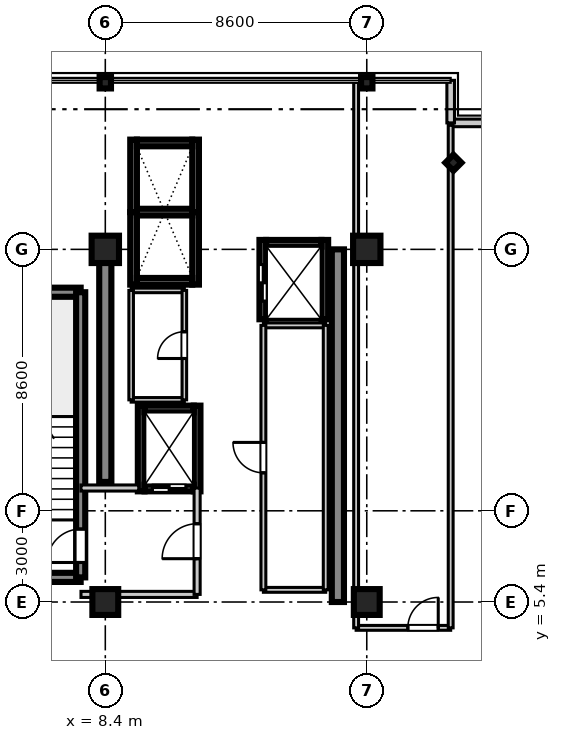
"""IFC4 building model, lengths in metres.
Left out: names, types, materials, properties, quantities, classifications, styles, units other than length and angle.
Written with IfcOpenShell. Run it as: python <this file> out.ifc"""

import sys

from ifc_helpers import new_model, si_unit, direction, frame, frame_2d, origin, origin_2d, place, context, subcontext, project, spatial, rectangle, i_section, extrude, source, transform, mapped, element, fill, save


model = new_model("IFC4")
c1 = context("Model", 3, precision=1e-05, world=origin(), true_north=direction((0.0, 1.0)))
c2 = subcontext(c1, "Body", "Model", "MODEL_VIEW")
j1 = project(units=[si_unit("LENGTHUNIT", "METRE"), si_unit("PLANEANGLEUNIT", "RADIAN")], contexts=[c1])
p1 = place(None, origin())
s1 = spatial("IfcSite", under=j1, at=p1, CompositionType="ELEMENT")
p2 = place(p1, origin())
s2 = spatial("IfcBuilding", under=s1, at=p2, CompositionType="ELEMENT")
p3 = place(p2, frame((0.0, 0.0, 273.8)))
s3 = spatial("IfcBuildingStorey", under=s2, at=p3, CompositionType="ELEMENT", Elevation=273.8)
m1 = source(origin(), c2, "Body", "SweptSolid", [
    extrude(rectangle(XDim=0.85, YDim=0.85, at=origin_2d()), origin(), (0.0, 0.0, 1.0), 3.705),
])
p4 = place(p3, frame((8.4, 5.4, 0.0), z_axis=(0.0, 0.0, 1.0), x_axis=(1.0, 0.0, 0.0)))
e1 = element("IfcColumn", 1, at=p4, inside=s3, PredefinedType="PILASTER", context=c2, shape_type="MappedRepresentation", body=[
    mapped(m1, transform((0.0, 0.0, 0.0), scale=1.0)),
])
m2 = source(origin(), c2, "Body", "SweptSolid", [
    extrude(rectangle(XDim=0.9, YDim=0.9, at=origin_2d()), origin(), (0.0, 0.0, 1.0), 3.705),
])
p5 = place(p3, frame((8.4, 17.0, 0.0), z_axis=(0.0, 0.0, 1.0), x_axis=(1.0, 0.0, 0.0)))
e2 = element("IfcColumn", 2, at=p5, inside=s3, PredefinedType="COLUMN", context=c2, shape_type="MappedRepresentation", body=[
    mapped(m2, transform((0.0, 0.0, 0.0), scale=1.0)),
])
p6 = place(p3, frame((17.0, 5.4, 0.0), z_axis=(0.0, 0.0, 1.0), x_axis=(1.0, 0.0, 0.0)))
e3 = element("IfcColumn", 3, at=p6, inside=s3, PredefinedType="PILASTER", context=c2, shape_type="MappedRepresentation", body=[
    mapped(m1, transform((0.0, 0.0, 0.0), scale=1.0)),
])
p7 = place(p3, frame((17.0, 17.0, 0.0), z_axis=(0.0, 0.0, 1.0), x_axis=(1.0, 0.0, 0.0)))
e4 = element("IfcColumn", 4, at=p7, inside=s3, PredefinedType="COLUMN", context=c2, shape_type="MappedRepresentation", body=[
    mapped(m2, transform((0.0, 0.0, 0.0), scale=1.0)),
])
m3 = source(origin(), c2, "Body", "SweptSolid", [
    extrude(i_section(OverallWidth=0.374, OverallDepth=0.374, WebThickness=0.014, FlangeThickness=0.023, at=origin_2d()), origin(), (0.0, 0.0, 1.0), 3.705),
])
for number, where, z_axis, x_axis in (
    (5, (8.4, 22.48, 0.0), (0.0, 0.0, 1.0), (0.0, 1.0, 0.0)),
    (6, (17.0, 22.48, 0.0), (0.0, 0.0, 1.0), (0.0, 1.0, 0.0)),
    (7, (19.85, 19.85, 0.0), (0.0, 0.0, 1.0), (0.707, 0.707, 0.0)),
):
    element("IfcColumn", number, at=place(p3, frame(where, z_axis=z_axis, x_axis=x_axis)), inside=s3, PredefinedType="COLUMN", context=c2, shape_type="MappedRepresentation", body=[
        mapped(m3, transform((0.0, 0.0, 0.0), scale=1.0)),
    ])
m4 = source(origin(), c2, "Body", "SweptSolid", [
    extrude(rectangle(XDim=7.65, YDim=0.4, at=frame_2d((3.825, 0.0))), origin(), (0.0, 0.0, 1.0), 3.45),
])
p8 = place(p3, frame((8.4, 9.35, 0.0), z_axis=(0.0, 0.0, 1.0), x_axis=(0.0, 1.0, 0.0)))
e8 = element("IfcWall", 8, at=p8, inside=s3, PredefinedType="SHEAR", context=c2, shape_type="MappedRepresentation", body=[
    mapped(m4, transform((0.0, 0.0, 0.0), scale=1.0)),
])
m5 = source(origin(), c2, "Body", "SweptSolid", [
    extrude(rectangle(XDim=11.6, YDim=0.4, at=frame_2d((5.8, 0.0))), origin(), (0.0, 0.0, 1.0), 3.45),
])
p9 = place(p3, frame((16.05, 5.4, 0.0), z_axis=(0.0, 0.0, 1.0), x_axis=(0.0, 1.0, 0.0)))
e9 = element("IfcWall", 9, at=p9, inside=s3, PredefinedType="SHEAR", context=c2, shape_type="MappedRepresentation", body=[
    mapped(m5, transform((0.0, 0.0, 0.0), scale=1.0)),
])
m6 = source(origin(), c2, "Body", "SweptSolid", [
    extrude(rectangle(XDim=3.98, YDim=0.3, at=frame_2d((1.99, 0.0))), origin(), (0.0, 0.0, 1.0), 3.45),
])
for number, where, z_axis, x_axis in (
    (10, (3.61, 6.21, 0.0), (0.0, 0.0, 1.0), (1.0, 0.0, 0.0)),
    (11, (3.61, 15.59, 0.0), (0.0, 0.0, 1.0), (1.0, 0.0, 0.0)),
):
    element("IfcWall", number, at=place(p3, frame(where, z_axis=z_axis, x_axis=x_axis)), inside=s3, PredefinedType="SHEAR", context=c2, shape_type="MappedRepresentation", body=[
        mapped(m6, transform((0.0, 0.0, 0.0), scale=1.0)),
    ])
m7 = source(origin(), c2, "Body", "SweptSolid", [
    extrude(rectangle(XDim=9.38, YDim=0.3, at=frame_2d((4.69, 0.0))), origin(), (0.0, 0.0, 1.0), 3.45),
])
p10 = place(p3, frame((7.59, 6.21, 0.0), z_axis=(0.0, 0.0, 1.0), x_axis=(0.0, 1.0, 0.0)))
e12 = element("IfcWall", 12, at=p10, inside=s3, PredefinedType="SHEAR", context=c2, shape_type="MappedRepresentation", body=[
    mapped(m7, transform((0.0, 0.0, 0.0), scale=1.0)),
])
p11 = place(p10, frame((0.49, 0.0, 0.0)))
e13 = element("IfcOpeningElement", 13, at=p11, cuts=e12, PredefinedType="OPENING", context=c2, shape_type="SweptSolid", body=[
    extrude(rectangle(XDim=1.1, YDim=2.15, at=frame_2d((0.55, 1.075))), frame((0.0, 0.16, 0.0), z_axis=(0.0, -1.0, 0.0), x_axis=(1.0, 0.0, 0.0)), (0.0, 0.0, 1.0), 0.32),
])
m8 = source(origin(), c2, "Body", "SweptSolid", [
    extrude(rectangle(XDim=2.385, YDim=0.22, at=frame_2d((1.192, 0.0))), origin(), (0.0, 0.0, 1.0), 3.45),
])
for number, where, z_axis, x_axis in (
    (14, (9.33, 15.84, 0.0), (0.0, 0.0, 1.0), (0.0, 1.0, 0.0)),
    (15, (11.37, 15.84, 0.0), (0.0, 0.0, 1.0), (0.0, 1.0, 0.0)),
):
    element("IfcWall", number, at=place(p3, frame(where, z_axis=z_axis, x_axis=x_axis)), inside=s3, PredefinedType="SHEAR", context=c2, shape_type="MappedRepresentation", body=[
        mapped(m8, transform((0.0, 0.0, 0.0), scale=1.0)),
    ])
m9 = source(origin(), c2, "Body", "SweptSolid", [
    extrude(rectangle(XDim=1.82, YDim=0.22, at=frame_2d((0.91, 0.0))), origin(), (0.0, 0.0, 1.0), 3.45),
])
p12 = place(p3, frame((9.44, 15.95, 0.0), z_axis=(0.0, 0.0, 1.0), x_axis=(1.0, 0.0, 0.0)))
e16 = element("IfcWall", 16, at=p12, inside=s3, PredefinedType="SHEAR", context=c2, shape_type="MappedRepresentation", body=[
    mapped(m9, transform((0.0, 0.0, 0.0), scale=1.0)),
])
m10 = source(origin(), c2, "Body", "SweptSolid", [
    extrude(rectangle(XDim=1.82, YDim=0.22, at=frame_2d((0.91, 0.0))), origin(), (0.0, 0.0, 1.0), 3.75),
])
p13 = place(p3, frame((9.44, 18.225, 0.0), z_axis=(0.0, 0.0, 1.0), x_axis=(1.0, 0.0, 0.0)))
e17 = element("IfcWall", 17, at=p13, inside=s3, PredefinedType="SHEAR", context=c2, shape_type="MappedRepresentation", body=[
    mapped(m10, transform((0.0, 0.0, 0.0), scale=1.0)),
])
for number, where, z_axis, x_axis in (
    (18, (9.33, 18.225, 0.0), (0.0, 0.0, 1.0), (0.0, 1.0, 0.0)),
    (19, (11.37, 18.225, 0.0), (0.0, 0.0, 1.0), (0.0, 1.0, 0.0)),
):
    element("IfcWall", number, at=place(p3, frame(where, z_axis=z_axis, x_axis=x_axis)), inside=s3, PredefinedType="SHEAR", context=c2, shape_type="MappedRepresentation", body=[
        mapped(m8, transform((0.0, 0.0, 0.0), scale=1.0)),
    ])
p14 = place(p3, frame((9.44, 20.5, 0.0), z_axis=(0.0, 0.0, 1.0), x_axis=(1.0, 0.0, 0.0)))
e20 = element("IfcWall", 20, at=p14, inside=s3, PredefinedType="SHEAR", context=c2, shape_type="MappedRepresentation", body=[
    mapped(m9, transform((0.0, 0.0, 0.0), scale=1.0)),
])
m11 = source(origin(), c2, "Body", "SweptSolid", [
    extrude(rectangle(XDim=2.82, YDim=0.22, at=frame_2d((1.41, 0.0))), origin(), (0.0, 0.0, 1.0), 3.45),
])
for number, where, z_axis, x_axis in (
    (21, (9.58, 9.04, 0.0), (0.0, 0.0, 1.0), (0.0, 1.0, 0.0)),
    (22, (11.42, 9.04, 0.0), (0.0, 0.0, 1.0), (0.0, 1.0, 0.0)),
):
    element("IfcWall", number, at=place(p3, frame(where, z_axis=z_axis, x_axis=x_axis)), inside=s3, PredefinedType="SHEAR", context=c2, shape_type="MappedRepresentation", body=[
        mapped(m11, transform((0.0, 0.0, 0.0), scale=1.0)),
    ])
m12 = source(origin(), c2, "Body", "SweptSolid", [
    extrude(rectangle(XDim=1.62, YDim=0.22, at=frame_2d((0.81, 0.0))), origin(), (0.0, 0.0, 1.0), 3.45),
])
p15 = place(p3, frame((9.69, 9.15, 0.0), z_axis=(0.0, 0.0, 1.0), x_axis=(1.0, 0.0, 0.0)))
e23 = element("IfcWall", 23, at=p15, inside=s3, PredefinedType="SHEAR", context=c2, shape_type="MappedRepresentation", body=[
    mapped(m12, transform((0.0, 0.0, 0.0), scale=1.0)),
])
p16 = place(p15, frame((0.26, 0.0, 0.0)))
e24 = element("IfcOpeningElement", 24, at=p16, cuts=e23, PredefinedType="OPENING", context=c2, shape_type="SweptSolid", body=[
    extrude(rectangle(XDim=1.1, YDim=2.2, at=frame_2d((0.55, 1.1))), frame((0.0, 0.12, 0.0), z_axis=(0.0, -1.0, 0.0), x_axis=(1.0, 0.0, 0.0)), (0.0, 0.0, 1.0), 0.24),
])
p17 = place(p3, frame((9.69, 11.75, 0.0), z_axis=(0.0, 0.0, 1.0), x_axis=(1.0, 0.0, 0.0)))
e25 = element("IfcWall", 25, at=p17, inside=s3, PredefinedType="SHEAR", context=c2, shape_type="MappedRepresentation", body=[
    mapped(m12, transform((0.0, 0.0, 0.0), scale=1.0)),
])
m13 = source(origin(), c2, "Body", "SweptSolid", [
    extrude(rectangle(XDim=2.61, YDim=0.22, at=frame_2d((1.305, 0.0))), origin(), (0.0, 0.0, 1.0), 3.45),
])
p18 = place(p3, frame((13.58, 14.7, 0.0), z_axis=(0.0, 0.0, 1.0), x_axis=(0.0, 1.0, 0.0)))
e26 = element("IfcWall", 26, at=p18, inside=s3, PredefinedType="SHEAR", context=c2, shape_type="MappedRepresentation", body=[
    mapped(m13, transform((0.0, 0.0, 0.0), scale=1.0)),
])
p19 = place(p18, frame((0.6, 0.0, 0.0)))
e27 = element("IfcOpeningElement", 27, at=p19, cuts=e26, PredefinedType="OPENING", context=c2, shape_type="SweptSolid", body=[
    extrude(rectangle(XDim=1.2, YDim=2.2, at=frame_2d((0.6, 1.1))), frame((0.0, 0.12, 0.0), z_axis=(0.0, -1.0, 0.0), x_axis=(1.0, 0.0, 0.0)), (0.0, 0.0, 1.0), 0.24),
])
p20 = place(p3, frame((15.62, 14.7, 0.0), z_axis=(0.0, 0.0, 1.0), x_axis=(0.0, 1.0, 0.0)))
e28 = element("IfcWall", 28, at=p20, inside=s3, PredefinedType="SHEAR", context=c2, shape_type="MappedRepresentation", body=[
    mapped(m13, transform((0.0, 0.0, 0.0), scale=1.0)),
])
p21 = place(p3, frame((13.69, 17.2, 0.0), z_axis=(0.0, 0.0, 1.0), x_axis=(1.0, 0.0, 0.0)))
e29 = element("IfcWall", 29, at=p21, inside=s3, PredefinedType="SHEAR", context=c2, shape_type="MappedRepresentation", body=[
    mapped(m9, transform((0.0, 0.0, 0.0), scale=1.0)),
])
m14 = source(origin(), c2, "Body", "SweptSolid", [
    extrude(rectangle(XDim=1.4, YDim=0.25, at=frame_2d((0.7, 0.0))), origin(), (0.0, 0.0, 1.0), 3.45),
])
p22 = place(p3, frame((19.76, 21.16, 0.0), z_axis=(0.0, 0.0, 1.0), x_axis=(1.0, 0.0, 0.0)))
e30 = element("IfcWall", 30, at=p22, inside=s3, PredefinedType="STANDARD", context=c2, shape_type="MappedRepresentation", body=[
    mapped(m14, transform((0.0, 0.0, 0.0), scale=1.0)),
])
m15 = source(origin(), c2, "Body", "SweptSolid", [
    extrude(rectangle(XDim=1.4, YDim=0.25, at=frame_2d((0.7, 0.0))), origin(), (0.0, 0.0, 1.0), 3.45),
])
p23 = place(p3, frame((19.76, 21.16, 0.0), z_axis=(0.0, 0.0, 1.0), x_axis=(0.0, 1.0, 0.0)))
e31 = element("IfcWall", 31, at=p23, inside=s3, PredefinedType="STANDARD", context=c2, shape_type="MappedRepresentation", body=[
    mapped(m15, transform((0.0, 0.0, 0.0), scale=1.0)),
])
m16 = source(origin(), c2, "Body", "SweptSolid", [
    extrude(rectangle(XDim=3.82, YDim=0.2, at=frame_2d((1.91, 0.0))), origin(), (0.0, 0.0, 1.0), 2.79),
])
p24 = place(p3, frame((7.6, 5.65, 0.0), z_axis=(0.0, 0.0, 1.0), x_axis=(1.0, 0.0, 0.0)))
e32 = element("IfcWall", 32, at=p24, inside=s3, PredefinedType="PARTITIONING", context=c2, shape_type="MappedRepresentation", body=[
    mapped(m16, transform((0.0, 0.0, 0.0), scale=1.0)),
])
m17 = source(origin(), c2, "Body", "SweptSolid", [
    extrude(rectangle(XDim=1.9, YDim=0.2, at=frame_2d((0.95, 0.0))), origin(), (0.0, 0.0, 1.0), 2.79),
])
p25 = place(p3, frame((7.6, 9.15, 0.0), z_axis=(0.0, 0.0, 1.0), x_axis=(1.0, 0.0, 0.0)))
e33 = element("IfcWall", 33, at=p25, inside=s3, PredefinedType="PARTITIONING", context=c2, shape_type="MappedRepresentation", body=[
    mapped(m17, transform((0.0, 0.0, 0.0), scale=1.0)),
])
m18 = source(origin(), c2, "Body", "SweptSolid", [
    extrude(rectangle(XDim=3.5, YDim=0.2, at=frame_2d((1.75, 0.0))), origin(), (0.0, 0.0, 1.0), 2.79),
])
p26 = place(p3, frame((11.42, 5.65, 0.0), z_axis=(0.0, 0.0, 1.0), x_axis=(0.0, 1.0, 0.0)))
e34 = element("IfcWall", 34, at=p26, inside=s3, PredefinedType="PARTITIONING", context=c2, shape_type="MappedRepresentation", body=[
    mapped(m18, transform((0.0, 0.0, 0.0), scale=1.0)),
])
p27 = place(p26, frame((1.175, 0.0, 0.0)))
e35 = element("IfcOpeningElement", 35, at=p27, cuts=e34, PredefinedType="OPENING", context=c2, shape_type="SweptSolid", body=[
    extrude(rectangle(XDim=1.15, YDim=2.15, at=frame_2d((0.575, 1.075))), frame((0.0, 0.11, 0.0), z_axis=(0.0, -1.0, 0.0), x_axis=(1.0, 0.0, 0.0)), (0.0, 0.0, 1.0), 0.22),
])
m19 = source(origin(), c2, "Body", "SweptSolid", [
    extrude(rectangle(XDim=1.75, YDim=0.15, at=frame_2d((0.875, 0.0))), origin(), (0.0, 0.0, 1.0), 2.79),
])
for number, where, z_axis, x_axis in (
    (36, (9.25, 12.05, 0.0), (0.0, 0.0, 1.0), (1.0, 0.0, 0.0)),
    (37, (9.25, 15.65, 0.0), (0.0, 0.0, 1.0), (1.0, 0.0, 0.0)),
):
    element("IfcWall", number, at=place(p3, frame(where, z_axis=z_axis, x_axis=x_axis)), inside=s3, PredefinedType="PARTITIONING", context=c2, shape_type="MappedRepresentation", body=[
        mapped(m19, transform((0.0, 0.0, 0.0), scale=1.0)),
    ])
m20 = source(origin(), c2, "Body", "SweptSolid", [
    extrude(rectangle(XDim=3.6, YDim=0.15, at=frame_2d((1.8, 0.0))), origin(), (0.0, 0.0, 1.0), 2.79),
])
p28 = place(p3, frame((9.25, 12.05, 0.0), z_axis=(0.0, 0.0, 1.0), x_axis=(0.0, 1.0, 0.0)))
e38 = element("IfcWall", 38, at=p28, inside=s3, PredefinedType="PARTITIONING", context=c2, shape_type="MappedRepresentation", body=[
    mapped(m20, transform((0.0, 0.0, 0.0), scale=1.0)),
])
p29 = place(p3, frame((11.0, 12.05, 0.0), z_axis=(0.0, 0.0, 1.0), x_axis=(0.0, 1.0, 0.0)))
e39 = element("IfcWall", 39, at=p29, inside=s3, PredefinedType="PARTITIONING", context=c2, shape_type="MappedRepresentation", body=[
    mapped(m20, transform((0.0, 0.0, 0.0), scale=1.0)),
])
p30 = place(p29, frame((1.36, 0.0, 0.0)))
e40 = element("IfcOpeningElement", 40, at=p30, cuts=e39, PredefinedType="OPENING", context=c2, shape_type="SweptSolid", body=[
    extrude(rectangle(XDim=0.88, YDim=2.1, at=frame_2d((0.44, 1.05))), frame((0.0, 0.085, 0.0), z_axis=(0.0, -1.0, 0.0), x_axis=(1.0, 0.0, 0.0)), (0.0, 0.0, 1.0), 0.17),
])
m21 = source(origin(), c2, "Body", "SweptSolid", [
    extrude(rectangle(XDim=2.05, YDim=0.16, at=frame_2d((1.025, 0.0))), origin(), (0.0, 0.0, 1.0), 2.79),
])
for number, where, z_axis, x_axis in (
    (41, (13.6, 5.8, 0.0), (0.0, 0.0, 1.0), (1.0, 0.0, 0.0)),
    (42, (13.6, 14.5, 0.0), (0.0, 0.0, 1.0), (1.0, 0.0, 0.0)),
):
    element("IfcWall", number, at=place(p3, frame(where, z_axis=z_axis, x_axis=x_axis)), inside=s3, PredefinedType="PARTITIONING", context=c2, shape_type="MappedRepresentation", body=[
        mapped(m21, transform((0.0, 0.0, 0.0), scale=1.0)),
    ])
m22 = source(origin(), c2, "Body", "SweptSolid", [
    extrude(rectangle(XDim=8.7, YDim=0.16, at=frame_2d((4.35, 0.0))), origin(), (0.0, 0.0, 1.0), 2.79),
])
p31 = place(p3, frame((13.6, 5.8, 0.0), z_axis=(0.0, 0.0, 1.0), x_axis=(0.0, 1.0, 0.0)))
e43 = element("IfcWall", 43, at=p31, inside=s3, PredefinedType="PARTITIONING", context=c2, shape_type="MappedRepresentation", body=[
    mapped(m22, transform((0.0, 0.0, 0.0), scale=1.0)),
])
p32 = place(p31, frame((3.85, 0.0, 0.0)))
e44 = element("IfcOpeningElement", 44, at=p32, cuts=e43, PredefinedType="OPENING", context=c2, shape_type="SweptSolid", body=[
    extrude(rectangle(XDim=1.0, YDim=2.1, at=frame_2d((0.5, 1.05))), frame((0.0, 0.09, 0.0), z_axis=(0.0, -1.0, 0.0), x_axis=(1.0, 0.0, 0.0)), (0.0, 0.0, 1.0), 0.18),
])
p33 = place(p3, frame((15.65, 5.8, 0.0), z_axis=(0.0, 0.0, 1.0), x_axis=(0.0, 1.0, 0.0)))
e45 = element("IfcWall", 45, at=p33, inside=s3, PredefinedType="PARTITIONING", context=c2, shape_type="MappedRepresentation", body=[
    mapped(m22, transform((0.0, 0.0, 0.0), scale=1.0)),
])
m23 = source(origin(), c2, "Body", "SweptSolid", [
    extrude(rectangle(XDim=3.11, YDim=0.16, at=frame_2d((1.555, 0.0))), origin(), (0.0, 0.0, 1.0), 2.79),
])
p34 = place(p3, frame((16.65, 4.55, 0.0), z_axis=(0.0, 0.0, 1.0), x_axis=(1.0, 0.0, 0.0)))
e46 = element("IfcWall", 46, at=p34, inside=s3, PredefinedType="PARTITIONING", context=c2, shape_type="MappedRepresentation", body=[
    mapped(m23, transform((0.0, 0.0, 0.0), scale=1.0)),
])
p35 = place(p34, frame((1.701, 0.0, 0.0)))
e47 = element("IfcOpeningElement", 47, at=p35, cuts=e46, PredefinedType="OPENING", context=c2, shape_type="SweptSolid", body=[
    extrude(rectangle(XDim=1.0, YDim=2.1, at=frame_2d((0.5, 1.05))), frame((0.0, 0.09, 0.0), z_axis=(0.0, -1.0, 0.0), x_axis=(1.0, 0.0, 0.0)), (0.0, 0.0, 1.0), 0.18),
])
m24 = source(origin(), c2, "Body", "SweptSolid", [
    extrude(rectangle(XDim=17.95, YDim=0.16, at=frame_2d((8.975, 0.0))), origin(), (0.0, 0.0, 1.0), 2.79),
])
p36 = place(p3, frame((16.65, 4.55, 0.0), z_axis=(0.0, 0.0, 1.0), x_axis=(0.0, 1.0, 0.0)))
e48 = element("IfcWall", 48, at=p36, inside=s3, PredefinedType="PARTITIONING", context=c2, shape_type="MappedRepresentation", body=[
    mapped(m24, transform((0.0, 0.0, 0.0), scale=1.0)),
])
m25 = source(origin(), c2, "Body", "SweptSolid", [
    extrude(rectangle(XDim=16.53, YDim=0.16, at=frame_2d((8.265, 0.0))), origin(), (0.0, 0.0, 1.0), 2.79),
])
p37 = place(p3, frame((19.76, 4.55, 0.0), z_axis=(0.0, 0.0, 1.0), x_axis=(0.0, 1.0, 0.0)))
e49 = element("IfcWall", 49, at=p37, inside=s3, PredefinedType="PARTITIONING", context=c2, shape_type="MappedRepresentation", body=[
    mapped(m25, transform((0.0, 0.0, 0.0), scale=1.0)),
])
m26 = source(origin(), c2, "Body", "SweptSolid", [
    extrude(rectangle(XDim=1.1, YDim=2.15, at=frame_2d((0.55, 1.075))), frame((0.0, 0.025, 0.0), z_axis=(0.0, -1.0, 0.0), x_axis=(1.0, 0.0, 0.0)), (0.0, 0.0, 1.0), 0.05),
])
p38 = place(p11, origin())
e50 = element("IfcDoor", 50, at=p38, inside=s3, OperationType="SINGLE_SWING_LEFT", PredefinedType="DOOR", context=c2, shape_type="MappedRepresentation", body=[
    mapped(m26, transform((0.0, 0.0, 0.0), scale=1.0)),
])
fill(e13, e50)
m27 = source(origin(), c2, "Body", "SweptSolid", [
    extrude(rectangle(XDim=1.1, YDim=2.2, at=frame_2d((0.55, 1.1))), frame((0.0, 0.025, 0.0), z_axis=(0.0, -1.0, 0.0), x_axis=(1.0, 0.0, 0.0)), (0.0, 0.0, 1.0), 0.05),
])
p39 = place(p16, frame((1.1, 0.0, 0.0), z_axis=(0.0, 0.0, 1.0), x_axis=(-1.0, 0.0, 0.0)))
e51 = element("IfcDoor", 51, at=p39, inside=s3, OperationType="DOUBLE_DOOR_SLIDING", PredefinedType="DOOR", context=c2, shape_type="MappedRepresentation", body=[
    mapped(m27, transform((0.0, 0.0, 0.0), scale=1.0)),
])
fill(e24, e51)
m28 = source(origin(), c2, "Body", "SweptSolid", [
    extrude(rectangle(XDim=1.2, YDim=2.2, at=frame_2d((0.6, 1.1))), frame((0.0, 0.025, 0.0), z_axis=(0.0, -1.0, 0.0), x_axis=(1.0, 0.0, 0.0)), (0.0, 0.0, 1.0), 0.05),
])
p40 = place(p19, origin())
e52 = element("IfcDoor", 52, at=p40, inside=s3, OperationType="DOUBLE_DOOR_SLIDING", PredefinedType="DOOR", context=c2, shape_type="MappedRepresentation", body=[
    mapped(m28, transform((0.0, 0.0, 0.0), scale=1.0)),
])
fill(e27, e52)
m29 = source(origin(), c2, "Body", "SweptSolid", [
    extrude(rectangle(XDim=1.15, YDim=2.15, at=frame_2d((0.575, 1.075))), frame((0.0, 0.025, 0.0), z_axis=(0.0, -1.0, 0.0), x_axis=(1.0, 0.0, 0.0)), (0.0, 0.0, 1.0), 0.05),
])
p41 = place(p27, frame((1.15, 0.0, 0.0), z_axis=(0.0, 0.0, 1.0), x_axis=(-1.0, 0.0, 0.0)))
e53 = element("IfcDoor", 53, at=p41, inside=s3, OperationType="SINGLE_SWING_LEFT", PredefinedType="DOOR", context=c2, shape_type="MappedRepresentation", body=[
    mapped(m29, transform((0.0, 0.0, 0.0), scale=1.0)),
])
fill(e35, e53)
m30 = source(origin(), c2, "Body", "SweptSolid", [
    extrude(rectangle(XDim=0.88, YDim=2.1, at=frame_2d((0.44, 1.05))), frame((0.0, 0.025, 0.0), z_axis=(0.0, -1.0, 0.0), x_axis=(1.0, 0.0, 0.0)), (0.0, 0.0, 1.0), 0.05),
])
p42 = place(p30, origin())
e54 = element("IfcDoor", 54, at=p42, inside=s3, OperationType="SINGLE_SWING_LEFT", PredefinedType="DOOR", context=c2, shape_type="MappedRepresentation", body=[
    mapped(m30, transform((0.0, 0.0, 0.0), scale=1.0)),
])
fill(e40, e54)
m31 = source(origin(), c2, "Body", "SweptSolid", [
    extrude(rectangle(XDim=1.0, YDim=2.1, at=frame_2d((0.5, 1.05))), frame((0.0, 0.025, 0.0), z_axis=(0.0, -1.0, 0.0), x_axis=(1.0, 0.0, 0.0)), (0.0, 0.0, 1.0), 0.05),
])
p43 = place(p32, frame((1.0, 0.0, 0.0), z_axis=(0.0, 0.0, 1.0), x_axis=(-1.0, 0.0, 0.0)))
e55 = element("IfcDoor", 55, at=p43, inside=s3, OperationType="SINGLE_SWING_RIGHT", PredefinedType="DOOR", context=c2, shape_type="MappedRepresentation", body=[
    mapped(m31, transform((0.0, 0.0, 0.0), scale=1.0)),
])
fill(e44, e55)
p44 = place(p35, origin())
e56 = element("IfcDoor", 56, at=p44, inside=s3, OperationType="SINGLE_SWING_RIGHT", PredefinedType="DOOR", context=c2, shape_type="MappedRepresentation", body=[
    mapped(m31, transform((0.0, 0.0, 0.0), scale=1.0)),
])
fill(e47, e56)
save(model, sys.argv[1])
